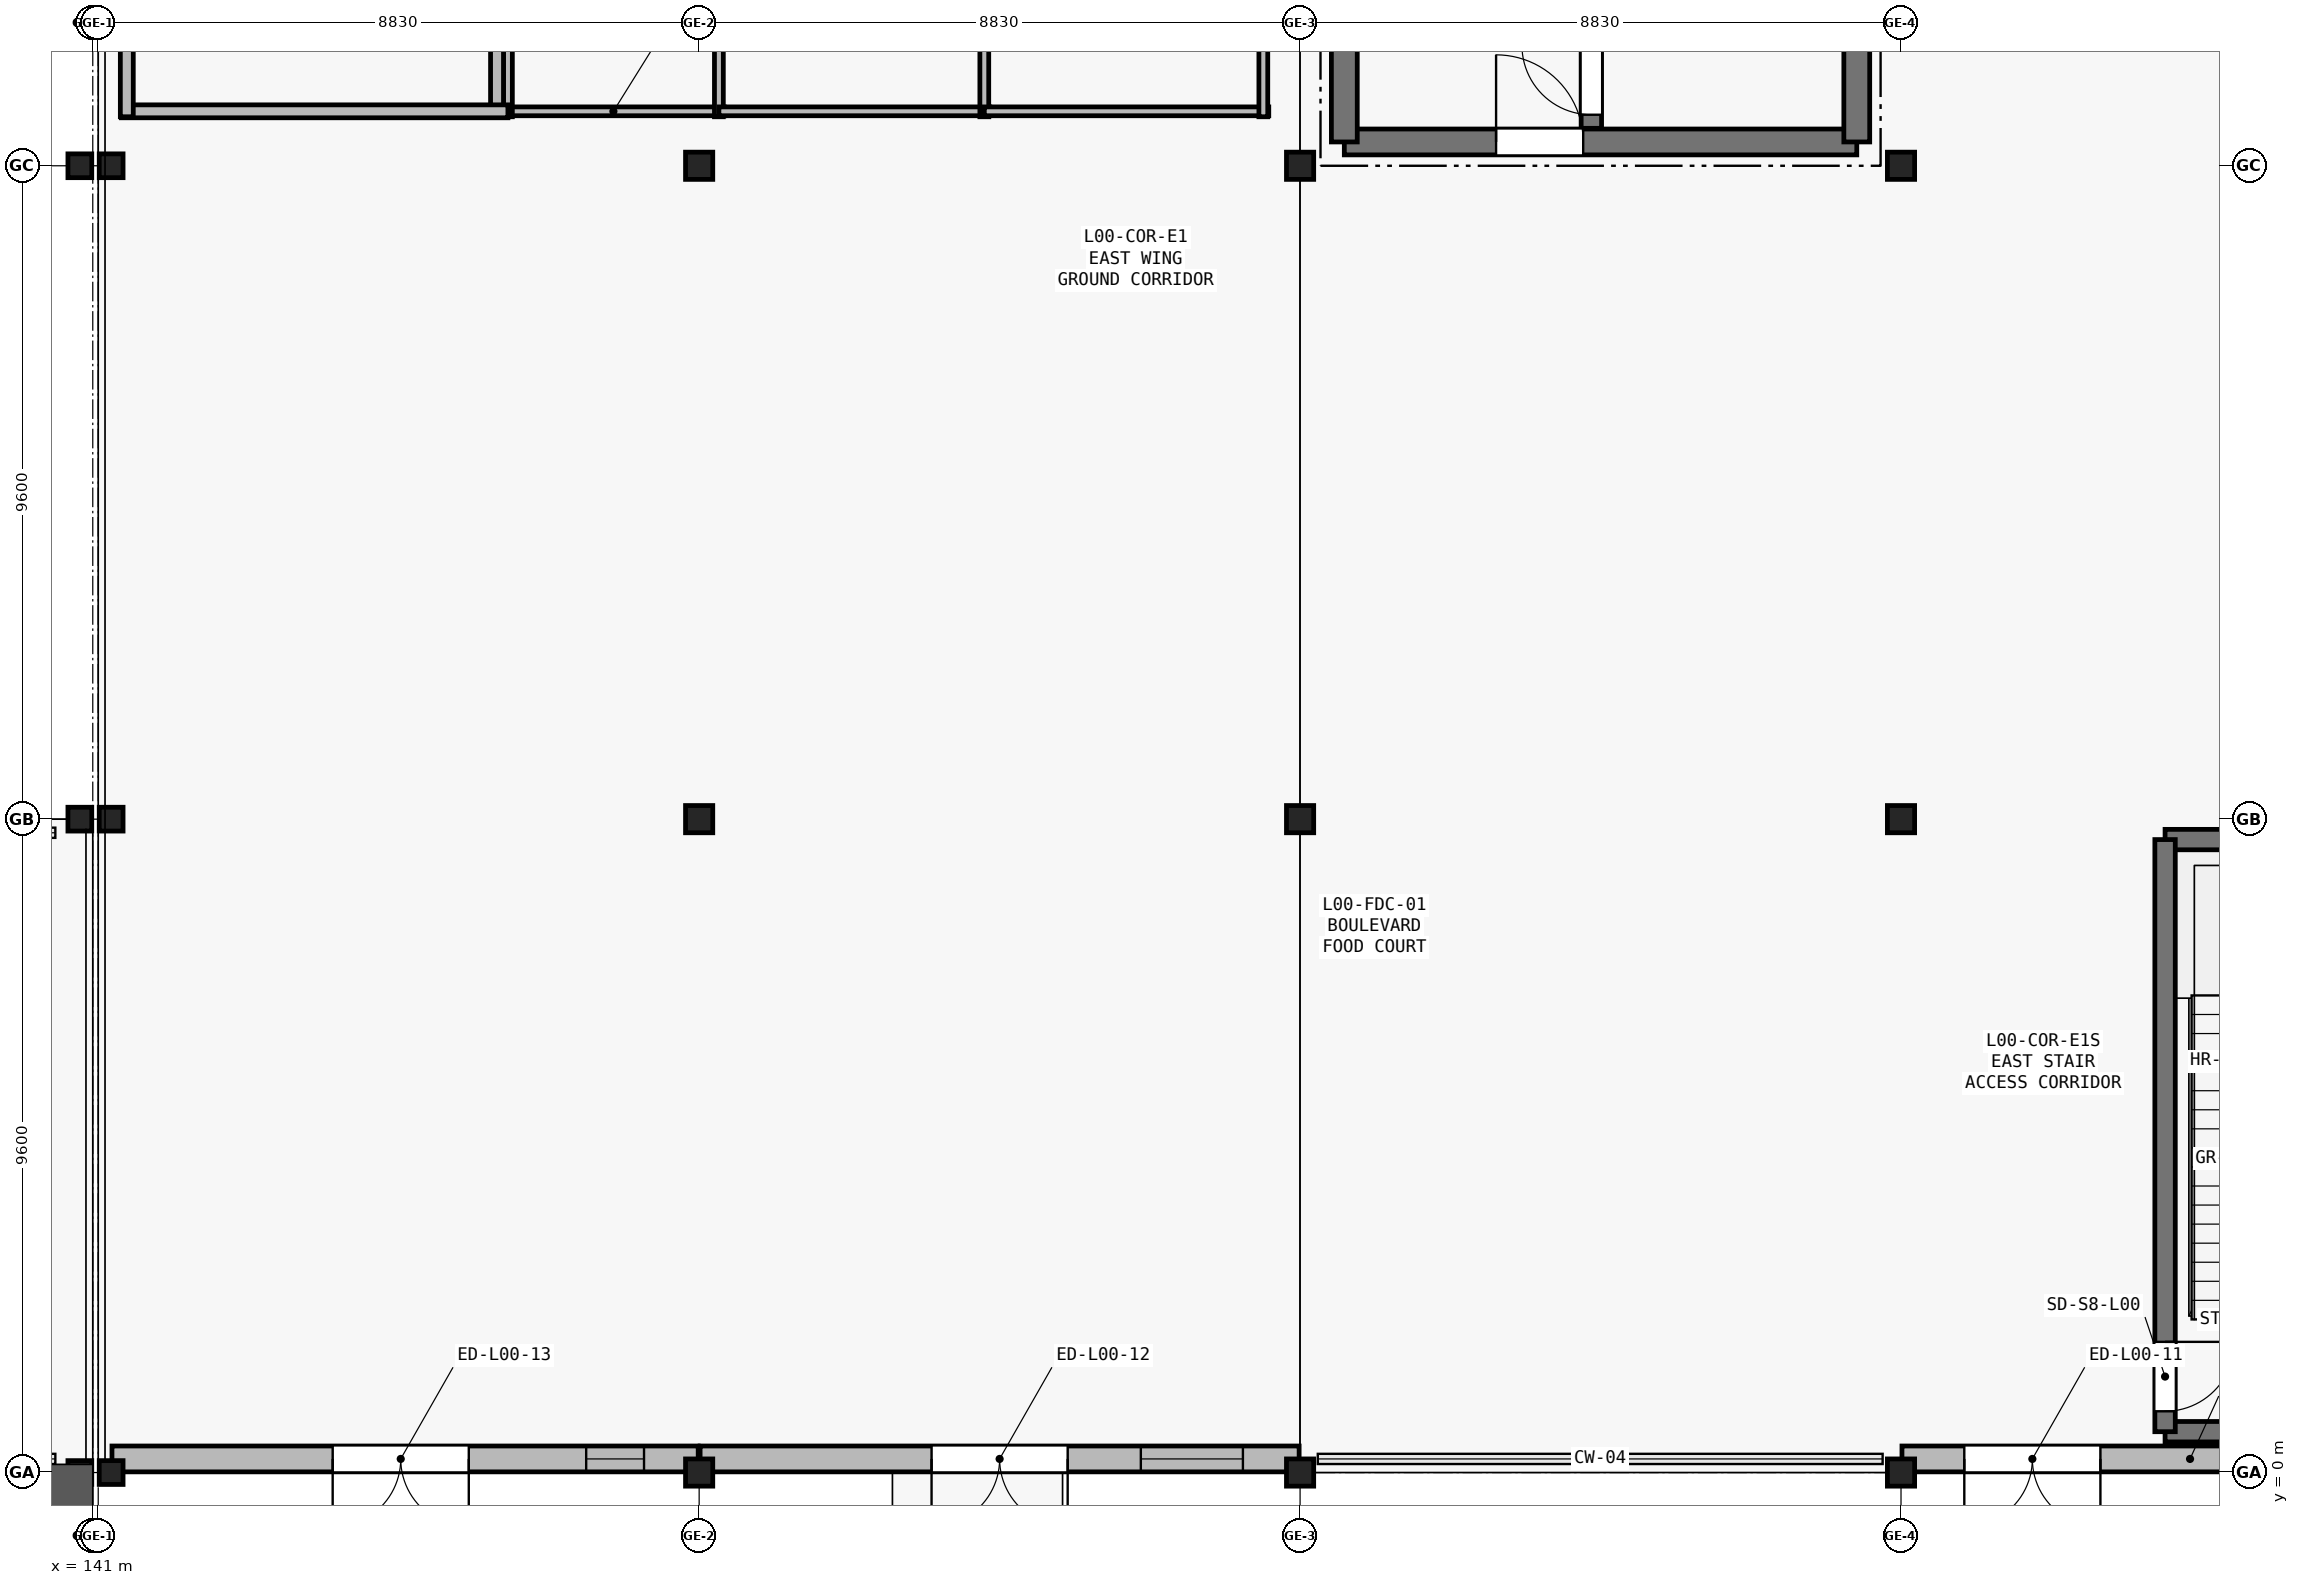
"""IFC4 building model, lengths in metres.
Left out: names, types, materials, properties, quantities, classifications, styles, units other than length and angle.
Written with IfcOpenShell. Run it as: python <this file> out.ifc"""

import sys

from ifc_helpers import new_model, si_unit, direction, frame, frame_2d, origin, origin_2d, place, context, subcontext, project, spatial, rectangle, i_section, extrude, element, fill, save


model = new_model("IFC4")
c1 = context("Model", 3, precision=1e-05, world=origin(), true_north=direction((0.0, 1.0)))
c2 = subcontext(c1, "Body", "Model", "MODEL_VIEW")
j1 = project(units=[si_unit("LENGTHUNIT", "METRE"), si_unit("PLANEANGLEUNIT", "RADIAN")], contexts=[c1])
p1 = place(None, origin())
s1 = spatial("IfcSite", under=j1, at=p1, CompositionType="ELEMENT")
p2 = place(p1, origin())
s2 = spatial("IfcBuilding", under=s1, at=p2, CompositionType="ELEMENT")
p3 = place(p2, origin())
s3 = spatial("IfcBuildingStorey", under=s2, at=p3, CompositionType="ELEMENT", Elevation=0.0)
for number, where, z_axis, x_axis in (
    (1, (140.81, 0.0, 0.0), (0.0, 0.0, 1.0), (1.0, 0.0, 0.0)),
    (2, (140.81, 9.6, 0.0), (0.0, 0.0, 1.0), (1.0, 0.0, 0.0)),
    (3, (140.81, 19.2, 0.0), (0.0, 0.0, 1.0), (1.0, 0.0, 0.0)),
    (4, (141.27, 0.0, 0.0), (0.0, 0.0, 1.0), (1.0, 0.0, 0.0)),
    (5, (141.27, 9.6, 0.0), (0.0, 0.0, 1.0), (1.0, 0.0, 0.0)),
    (6, (141.27, 19.2, 0.0), (0.0, 0.0, 1.0), (1.0, 0.0, 0.0)),
):
    element("IfcColumn", number, at=place(p3, frame(where, z_axis=z_axis, x_axis=x_axis)), inside=s3, PredefinedType="COLUMN", context=c2, shape_type="SweptSolid", body=[
        extrude(i_section(OverallWidth=0.35, OverallDepth=0.35, WebThickness=0.012, FlangeThickness=0.019, FilletRadius=0.02, at=origin_2d()), origin(), (0.0, 0.0, 1.0), 6.0),
    ])
for number, where, z_axis, x_axis in (
    (7, (149.91, 0.0, 0.0), (0.0, 0.0, 1.0), (1.0, 0.0, 0.0)),
    (8, (149.91, 9.6, 0.0), (0.0, 0.0, 1.0), (1.0, 0.0, 0.0)),
    (9, (149.91, 19.2, 0.0), (0.0, 0.0, 1.0), (1.0, 0.0, 0.0)),
    (10, (158.74, 0.0, 0.0), (0.0, 0.0, 1.0), (1.0, 0.0, 0.0)),
    (11, (158.74, 9.6, 0.0), (0.0, 0.0, 1.0), (1.0, 0.0, 0.0)),
    (12, (158.74, 19.2, 0.0), (0.0, 0.0, 1.0), (1.0, 0.0, 0.0)),
    (13, (167.57, 0.0, 0.0), (0.0, 0.0, 1.0), (1.0, 0.0, 0.0)),
    (14, (167.57, 9.6, 0.0), (0.0, 0.0, 1.0), (1.0, 0.0, 0.0)),
    (15, (167.57, 19.2, 0.0), (0.0, 0.0, 1.0), (1.0, 0.0, 0.0)),
):
    element("IfcColumn", number, at=place(p3, frame(where, z_axis=z_axis, x_axis=x_axis)), inside=s3, PredefinedType="COLUMN", context=c2, shape_type="SweptSolid", body=[
        extrude(i_section(OverallWidth=0.4, OverallDepth=0.4, WebThickness=0.013, FlangeThickness=0.021, FilletRadius=0.022, at=origin_2d()), origin(), (0.0, 0.0, 1.0), 6.0),
    ])
p4 = place(p3, frame((176.05, 0.2, 0.0), z_axis=(0.0, 0.0, 1.0), x_axis=(-1.0, 0.0, 0.0)))
e16 = element("IfcWall", 16, at=p4, inside=s3, PredefinedType="SOLIDWALL", context=c2, shape_type="SweptSolid", body=[
    extrude(rectangle(XDim=8.466, YDim=0.38, at=frame_2d((4.233, 0.0))), origin(), (0.0, 0.0, 1.0), 5.12),
])
p5 = place(p4, frame((5.55, 0.0, 0.0)))
e17 = element("IfcOpeningElement", 17, at=p5, cuts=e16, PredefinedType="OPENING", context=c2, shape_type="SweptSolid", body=[
    extrude(rectangle(XDim=2.0, YDim=2.2, at=frame_2d((1.0, 1.1))), frame((0.0, 0.2, 0.0), z_axis=(0.0, -1.0, 0.0), x_axis=(1.0, 0.0, 0.0)), (0.0, 0.0, 1.0), 0.4),
])
p6 = place(p4, frame((0.55, 0.0, 1.0)))
e18 = element("IfcOpeningElement", 18, at=p6, cuts=e16, PredefinedType="OPENING", context=c2, shape_type="SweptSolid", body=[
    extrude(rectangle(XDim=1.2, YDim=1.2, at=frame_2d((0.6, 0.6))), frame((0.0, 0.2, 0.0), z_axis=(0.0, -1.0, 0.0), x_axis=(1.0, 0.0, 0.0)), (0.0, 0.0, 1.0), 0.4),
])
p7 = place(p3, frame((158.726, 0.2, 0.0), z_axis=(0.0, 0.0, 1.0), x_axis=(-1.0, 0.0, 0.0)))
e19 = element("IfcWall", 19, at=p7, inside=s3, PredefinedType="SOLIDWALL", context=c2, shape_type="SweptSolid", body=[
    extrude(rectangle(XDim=8.802, YDim=0.38, at=frame_2d((4.401, 0.0))), origin(), (0.0, 0.0, 1.0), 5.12),
])
p8 = place(p7, frame((3.401, 0.0, 0.0)))
e20 = element("IfcOpeningElement", 20, at=p8, cuts=e19, PredefinedType="OPENING", context=c2, shape_type="SweptSolid", body=[
    extrude(rectangle(XDim=2.0, YDim=2.2, at=frame_2d((1.0, 1.1))), frame((0.0, 0.2, 0.0), z_axis=(0.0, -1.0, 0.0), x_axis=(1.0, 0.0, 0.0)), (0.0, 0.0, 1.0), 0.4),
])
p9 = place(p7, frame((0.826, 0.0, 1.0)))
e21 = element("IfcOpeningElement", 21, at=p9, cuts=e19, PredefinedType="OPENING", context=c2, shape_type="SweptSolid", body=[
    extrude(rectangle(XDim=1.5, YDim=1.2, at=frame_2d((0.75, 0.6))), frame((0.0, 0.2, 0.0), z_axis=(0.0, -1.0, 0.0), x_axis=(1.0, 0.0, 0.0)), (0.0, 0.0, 1.0), 0.4),
])
p10 = place(p3, frame((149.896, 0.2, 0.0), z_axis=(0.0, 0.0, 1.0), x_axis=(-1.0, 0.0, 0.0)))
e22 = element("IfcWall", 22, at=p10, inside=s3, PredefinedType="SOLIDWALL", context=c2, shape_type="SweptSolid", body=[
    extrude(rectangle(XDim=8.614, YDim=0.38, at=frame_2d((4.307, 0.0))), origin(), (0.0, 0.0, 1.0), 5.12),
])
p11 = place(p10, frame((3.371, 0.0, 0.0)))
e23 = element("IfcOpeningElement", 23, at=p11, cuts=e22, PredefinedType="OPENING", context=c2, shape_type="SweptSolid", body=[
    extrude(rectangle(XDim=2.0, YDim=2.2, at=frame_2d((1.0, 1.1))), frame((0.0, 0.2, 0.0), z_axis=(0.0, -1.0, 0.0), x_axis=(1.0, 0.0, 0.0)), (0.0, 0.0, 1.0), 0.4),
])
p12 = place(p10, frame((0.796, 0.0, 1.0)))
e24 = element("IfcOpeningElement", 24, at=p12, cuts=e22, PredefinedType="OPENING", context=c2, shape_type="SweptSolid", body=[
    extrude(rectangle(XDim=0.85, YDim=1.5, at=frame_2d((0.425, 0.75))), frame((0.0, 0.2, 0.0), z_axis=(0.0, -1.0, 0.0), x_axis=(1.0, 0.0, 0.0)), (0.0, 0.0, 1.0), 0.4),
])
p13 = place(p3, frame((159.39, 19.55, 0.0), z_axis=(0.0, 0.0, 1.0), x_axis=(1.0, 0.0, 0.0)))
e25 = element("IfcWall", 25, at=p13, inside=s3, PredefinedType="SHEAR", context=c2, shape_type="SweptSolid", body=[
    extrude(rectangle(XDim=7.53, YDim=0.38, at=frame_2d((3.765, 0.0))), origin(), (0.0, 0.0, 1.0), 6.0),
])
p14 = place(p13, frame((2.23, 0.0, 0.0)))
e26 = element("IfcOpeningElement", 26, at=p14, cuts=e25, PredefinedType="OPENING", context=c2, shape_type="SweptSolid", body=[
    extrude(rectangle(XDim=1.28, YDim=2.15, at=frame_2d((0.64, 1.075))), frame((0.0, 0.2, 0.0), z_axis=(0.0, -1.0, 0.0), x_axis=(1.0, 0.0, 0.0)), (0.0, 0.0, 1.0), 0.4),
])
for number, where, z_axis, x_axis in (
    (27, (159.39, 28.35, 0.0), (0.0, 0.0, 1.0), (0.0, -1.0, 0.0)),
    (28, (166.92, 19.55, 0.0), (0.0, 0.0, 1.0), (0.0, 1.0, 0.0)),
):
    element("IfcWall", number, at=place(p3, frame(where, z_axis=z_axis, x_axis=x_axis)), inside=s3, PredefinedType="SHEAR", context=c2, shape_type="SweptSolid", body=[
        extrude(rectangle(XDim=8.8, YDim=0.38, at=frame_2d((4.4, 0.0))), origin(), (0.0, 0.0, 1.0), 6.0),
    ])
p15 = place(p3, frame((163.02, 19.75, 0.0), z_axis=(0.0, 0.0, 1.0), x_axis=(0.0, 1.0, 0.0)))
e29 = element("IfcWall", 29, at=p15, inside=s3, PredefinedType="SHEAR", context=c2, shape_type="SweptSolid", body=[
    extrude(rectangle(XDim=8.4, YDim=0.3, at=frame_2d((4.2, 0.0))), origin(), (0.0, 0.0, 1.0), 6.0),
])
p16 = place(p15, frame((0.2, 0.0, 0.0)))
e30 = element("IfcOpeningElement", 30, at=p16, cuts=e29, PredefinedType="OPENING", context=c2, shape_type="SweptSolid", body=[
    extrude(rectangle(XDim=1.02, YDim=2.1, at=frame_2d((0.51, 1.05))), frame((0.0, 0.16, 0.0), z_axis=(0.0, -1.0, 0.0), x_axis=(1.0, 0.0, 0.0)), (0.0, 0.0, 1.0), 0.32),
])
for number, where, z_axis, x_axis in (
    (31, (171.45, 0.6, 0.0), (0.0, 0.0, 1.0), (1.0, 0.0, 0.0)),
    (32, (175.55, 9.3, 0.0), (0.0, 0.0, 1.0), (-1.0, 0.0, 0.0)),
):
    element("IfcWall", number, at=place(p3, frame(where, z_axis=z_axis, x_axis=x_axis)), inside=s3, PredefinedType="SHEAR", context=c2, shape_type="SweptSolid", body=[
        extrude(rectangle(XDim=4.1, YDim=0.3, at=frame_2d((2.05, 0.0))), origin(), (0.0, 0.0, 1.0), 6.0),
    ])
p17 = place(p3, frame((171.45, 9.3, 0.0), z_axis=(0.0, 0.0, 1.0), x_axis=(0.0, -1.0, 0.0)))
e33 = element("IfcWall", 33, at=p17, inside=s3, PredefinedType="SHEAR", context=c2, shape_type="SweptSolid", body=[
    extrude(rectangle(XDim=8.7, YDim=0.3, at=frame_2d((4.35, 0.0))), origin(), (0.0, 0.0, 1.0), 6.0),
])
p18 = place(p17, frame((7.38, 0.0, 0.0)))
e34 = element("IfcOpeningElement", 34, at=p18, cuts=e33, PredefinedType="OPENING", context=c2, shape_type="SweptSolid", body=[
    extrude(rectangle(XDim=1.02, YDim=2.1, at=frame_2d((0.51, 1.05))), frame((0.0, 0.16, 0.0), z_axis=(0.0, -1.0, 0.0), x_axis=(1.0, 0.0, 0.0)), (0.0, 0.0, 1.0), 0.32),
])
p19 = place(p3, frame((147.02, 20.0, 0.0), z_axis=(0.0, 0.0, 1.0), x_axis=(1.0, 0.0, 0.0)))
e35 = element("IfcWall", 35, at=p19, inside=s3, PredefinedType="PARTITIONING", context=c2, shape_type="SweptSolid", body=[
    extrude(rectangle(XDim=3.26, YDim=0.13, at=frame_2d((1.63, 0.0))), origin(), (0.0, 0.0, 1.0), 5.52),
])
p20 = place(p3, frame((150.2, 19.92, 0.0), z_axis=(0.0, 0.0, 1.0), x_axis=(0.0, 1.0, 0.0)))
e36 = element("IfcWall", 36, at=p20, inside=s3, PredefinedType="PARTITIONING", context=c2, shape_type="SweptSolid", body=[
    extrude(rectangle(XDim=4.16, YDim=0.13, at=frame_2d((2.08, 0.0))), origin(), (0.0, 0.0, 1.0), 5.52),
])
p21 = place(p3, frame((147.1, 24.08, 0.0), z_axis=(0.0, 0.0, 1.0), x_axis=(0.0, -1.0, 0.0)))
e37 = element("IfcWall", 37, at=p21, inside=s3, PredefinedType="PARTITIONING", context=c2, shape_type="SweptSolid", body=[
    extrude(rectangle(XDim=4.16, YDim=0.13, at=frame_2d((2.08, 0.0))), origin(), (0.0, 0.0, 1.0), 5.365),
])
p22 = place(p3, frame((150.2, 20.0, 0.0), z_axis=(0.0, 0.0, 1.0), x_axis=(1.0, 0.0, 0.0)))
e38 = element("IfcWall", 38, at=p22, inside=s3, PredefinedType="PARTITIONING", context=c2, shape_type="SweptSolid", body=[
    extrude(rectangle(XDim=3.98, YDim=0.13, at=frame_2d((1.99, 0.0))), origin(), (0.0, 0.0, 1.0), 5.52),
])
p23 = place(p3, frame((154.1, 19.92, 0.0), z_axis=(0.0, 0.0, 1.0), x_axis=(0.0, 1.0, 0.0)))
e39 = element("IfcWall", 39, at=p23, inside=s3, PredefinedType="PARTITIONING", context=c2, shape_type="SweptSolid", body=[
    extrude(rectangle(XDim=4.16, YDim=0.13, at=frame_2d((2.08, 0.0))), origin(), (0.0, 0.0, 1.0), 5.52),
])
p24 = place(p3, frame((154.1, 20.0, 0.0), z_axis=(0.0, 0.0, 1.0), x_axis=(1.0, 0.0, 0.0)))
e40 = element("IfcWall", 40, at=p24, inside=s3, PredefinedType="PARTITIONING", context=c2, shape_type="SweptSolid", body=[
    extrude(rectangle(XDim=4.18, YDim=0.13, at=frame_2d((2.09, 0.0))), origin(), (0.0, 0.0, 1.0), 5.52),
])
p25 = place(p3, frame((158.2, 19.92, 0.0), z_axis=(0.0, 0.0, 1.0), x_axis=(0.0, 1.0, 0.0)))
e41 = element("IfcWall", 41, at=p25, inside=s3, PredefinedType="PARTITIONING", context=c2, shape_type="SweptSolid", body=[
    extrude(rectangle(XDim=4.16, YDim=0.13, at=frame_2d((2.08, 0.0))), origin(), (0.0, 0.0, 1.0), 5.52),
])
p26 = place(p3, frame((146.94, 19.92, 0.0), z_axis=(0.0, 0.0, 1.0), x_axis=(0.0, 1.0, 0.0)))
e42 = element("IfcWall", 42, at=p26, inside=s3, PredefinedType="PARTITIONING", context=c2, shape_type="SweptSolid", body=[
    extrude(rectangle(XDim=15.66, YDim=0.19, at=frame_2d((7.83, 0.0))), origin(), (0.0, 0.0, 1.0), 5.365),
])
p27 = place(p26, frame((7.03, 0.0, 0.0)))
e43 = element("IfcOpeningElement", 43, at=p27, cuts=e42, PredefinedType="OPENING", context=c2, shape_type="SweptSolid", body=[
    extrude(rectangle(XDim=1.6, YDim=2.2, at=frame_2d((0.8, 1.1))), frame((0.0, 0.105, 0.0), z_axis=(0.0, -1.0, 0.0), x_axis=(1.0, 0.0, 0.0)), (0.0, 0.0, 1.0), 0.21),
])
p28 = place(p3, frame((141.42, 20.0, 0.0), z_axis=(0.0, 0.0, 1.0), x_axis=(1.0, 0.0, 0.0)))
e44 = element("IfcWall", 44, at=p28, inside=s3, PredefinedType="PARTITIONING", context=c2, shape_type="SweptSolid", body=[
    extrude(rectangle(XDim=5.68, YDim=0.19, at=frame_2d((2.84, 0.0))), origin(), (0.0, 0.0, 1.0), 5.52),
])
p29 = place(p3, frame((141.5, 35.58, 0.0), z_axis=(0.0, 0.0, 1.0), x_axis=(0.0, -1.0, 0.0)))
e45 = element("IfcWall", 45, at=p29, inside=s3, PredefinedType="PARTITIONING", context=c2, shape_type="SweptSolid", body=[
    extrude(rectangle(XDim=15.66, YDim=0.19, at=frame_2d((7.83, 0.0))), origin(), (0.0, 0.0, 1.0), 5.215),
])
p30 = place(p5, origin())
e46 = element("IfcDoor", 46, at=p30, inside=s3, OperationType="DOUBLE_DOOR_SINGLE_SWING", PredefinedType="DOOR", context=c2, shape_type="SweptSolid", body=[
    extrude(rectangle(XDim=2.0, YDim=2.2, at=frame_2d((1.0, 1.1))), frame((0.0, 0.025, 0.0), z_axis=(0.0, -1.0, 0.0), x_axis=(1.0, 0.0, 0.0)), (0.0, 0.0, 1.0), 0.05),
])
fill(e17, e46)
p31 = place(p8, origin())
e47 = element("IfcDoor", 47, at=p31, inside=s3, OperationType="DOUBLE_DOOR_SINGLE_SWING", PredefinedType="DOOR", context=c2, shape_type="SweptSolid", body=[
    extrude(rectangle(XDim=2.0, YDim=2.2, at=frame_2d((1.0, 1.1))), frame((0.0, 0.025, 0.0), z_axis=(0.0, -1.0, 0.0), x_axis=(1.0, 0.0, 0.0)), (0.0, 0.0, 1.0), 0.05),
])
fill(e20, e47)
p32 = place(p9, origin())
e48 = element("IfcWindow", 48, at=p32, inside=s3, PartitioningType="SINGLE_PANEL", PredefinedType="WINDOW", context=c2, shape_type="SweptSolid", body=[
    extrude(rectangle(XDim=1.5, YDim=1.2, at=frame_2d((0.75, 0.6))), frame((0.0, 0.03, 0.0), z_axis=(0.0, -1.0, 0.0), x_axis=(1.0, 0.0, 0.0)), (0.0, 0.0, 1.0), 0.06),
])
fill(e21, e48)
p33 = place(p11, origin())
e49 = element("IfcDoor", 49, at=p33, inside=s3, OperationType="DOUBLE_DOOR_SINGLE_SWING", PredefinedType="DOOR", context=c2, shape_type="SweptSolid", body=[
    extrude(rectangle(XDim=2.0, YDim=2.2, at=frame_2d((1.0, 1.1))), frame((0.0, 0.025, 0.0), z_axis=(0.0, -1.0, 0.0), x_axis=(1.0, 0.0, 0.0)), (0.0, 0.0, 1.0), 0.05),
])
fill(e23, e49)
p34 = place(p12, origin())
e50 = element("IfcWindow", 50, at=p34, inside=s3, PartitioningType="SINGLE_PANEL", PredefinedType="WINDOW", context=c2, shape_type="SweptSolid", body=[
    extrude(rectangle(XDim=0.85, YDim=1.5, at=frame_2d((0.425, 0.75))), frame((0.0, 0.03, 0.0), z_axis=(0.0, -1.0, 0.0), x_axis=(1.0, 0.0, 0.0)), (0.0, 0.0, 1.0), 0.06),
])
fill(e24, e50)
p35 = place(p14, origin())
e51 = element("IfcDoor", 51, at=p35, inside=s3, OperationType="SINGLE_SWING_LEFT", PredefinedType="DOOR", context=c2, shape_type="SweptSolid", body=[
    extrude(rectangle(XDim=1.28, YDim=2.15, at=frame_2d((0.64, 1.075))), frame((0.0, 0.025, 0.0), z_axis=(0.0, -1.0, 0.0), x_axis=(1.0, 0.0, 0.0)), (0.0, 0.0, 1.0), 0.05),
])
fill(e26, e51)
p36 = place(p16, origin())
e52 = element("IfcDoor", 52, at=p36, inside=s3, OperationType="SINGLE_SWING_RIGHT", PredefinedType="DOOR", context=c2, shape_type="SweptSolid", body=[
    extrude(rectangle(XDim=1.02, YDim=2.1, at=frame_2d((0.51, 1.05))), frame((0.0, 0.025, 0.0), z_axis=(0.0, -1.0, 0.0), x_axis=(1.0, 0.0, 0.0)), (0.0, 0.0, 1.0), 0.05),
])
fill(e30, e52)
p37 = place(p18, origin())
e53 = element("IfcDoor", 53, at=p37, inside=s3, OperationType="SINGLE_SWING_LEFT", PredefinedType="DOOR", context=c2, shape_type="SweptSolid", body=[
    extrude(rectangle(XDim=1.02, YDim=2.1, at=frame_2d((0.51, 1.05))), frame((0.0, 0.025, 0.0), z_axis=(0.0, -1.0, 0.0), x_axis=(1.0, 0.0, 0.0)), (0.0, 0.0, 1.0), 0.05),
])
fill(e34, e53)
save(model, sys.argv[1])
